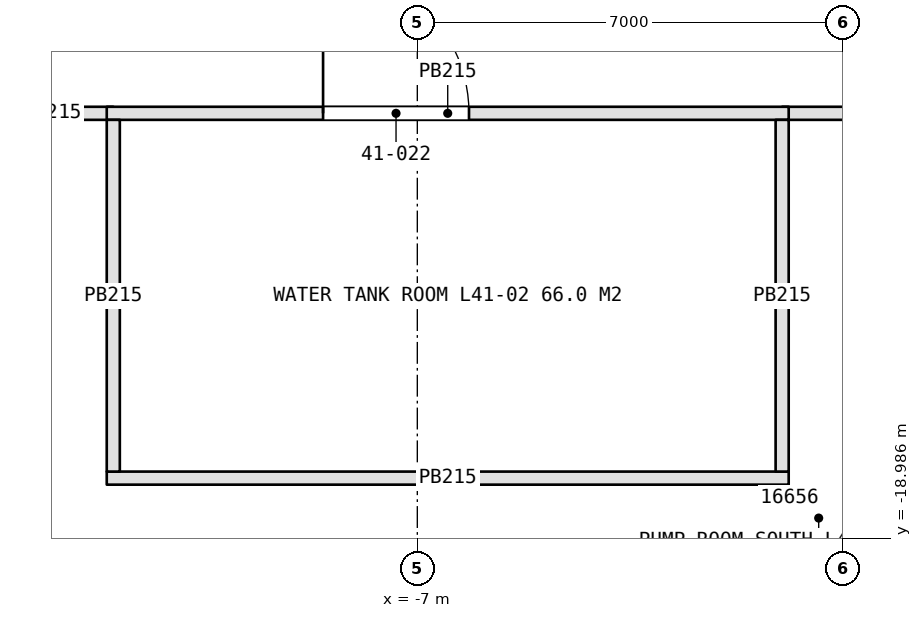
"""IFC4 building model, lengths in metres.
Left out: names, types, materials, properties, quantities, classifications, styles, units other than length and angle.
Written with IfcOpenShell. Run it as: python <this file> out.ifc"""

import sys

from ifc_helpers import new_model, si_unit, direction, frame, frame_2d, origin, origin_2d, place, context, subcontext, project, spatial, rectangle, hollow_rectangle, extrude, element, fill, save


model = new_model("IFC4")
c1 = context("Model", 3, precision=1e-05, world=origin(), true_north=direction((0.0, 1.0)))
c2 = subcontext(c1, "Body", "Model", "MODEL_VIEW")
j1 = project(units=[si_unit("LENGTHUNIT", "METRE"), si_unit("PLANEANGLEUNIT", "RADIAN")], contexts=[c1])
p1 = place(None, origin())
s1 = spatial("IfcSite", under=j1, at=p1, CompositionType="ELEMENT")
p2 = place(p1, origin())
s2 = spatial("IfcBuilding", under=s1, at=p2, CompositionType="ELEMENT")
p3 = place(p2, frame((0.0, 0.0, 189.8)))
s3 = spatial("IfcBuildingStorey", under=s2, at=p3, CompositionType="ELEMENT", Elevation=189.8)
p4 = place(p3, frame((-16.437, -21.164, 0.775), z_axis=(0.491993120685, 0.633450123943, 0.597230030788), x_axis=(-0.789769123982, 0.613404214857, 0.0)))
e1 = element("IfcColumn", 1, at=p4, inside=s3, PredefinedType="COLUMN", context=c2, shape_type="SweptSolid", body=[
    extrude(hollow_rectangle(XDim=1.3, YDim=1.3, WallThickness=0.15, at=origin_2d()), origin(), (0.0, 0.0, 1.0), 5.777),
])
p5 = place(p3, frame((-14.0, -12.0, 0.0), z_axis=(0.0, 0.0, 1.0), x_axis=(1.0, 0.0, 0.0)))
e2 = element("IfcWall", 2, at=p5, inside=s3, PredefinedType="PARTITIONING", context=c2, shape_type="SweptSolid", body=[
    extrude(rectangle(XDim=2.0, YDim=0.215, at=frame_2d((1.0, 0.0))), origin(), (0.0, 0.0, 1.0), 4.2),
])
p6 = place(p3, frame((-1.0, -12.0, 0.0), z_axis=(0.0, 0.0, 1.0), x_axis=(1.0, 0.0, 0.0)))
e3 = element("IfcWall", 3, at=p6, inside=s3, PredefinedType="PARTITIONING", context=c2, shape_type="SweptSolid", body=[
    extrude(rectangle(XDim=3.0, YDim=0.215, at=frame_2d((1.5, 0.0))), origin(), (0.0, 0.0, 1.0), 4.2),
])
p7 = place(p6, frame((1.7, 0.0, 0.0)))
e4 = element("IfcOpeningElement", 4, at=p7, cuts=e3, PredefinedType="OPENING", context=c2, shape_type="SweptSolid", body=[
    extrude(rectangle(XDim=1.0, YDim=2.2, at=frame_2d((0.5, 1.1))), frame((0.0, 0.118, 0.0), z_axis=(0.0, -1.0, 0.0), x_axis=(1.0, 0.0, 0.0)), (0.0, 0.0, 1.0), 0.235),
])
p8 = place(p3, frame((-12.107, -18.0, 0.0), z_axis=(0.0, 0.0, 1.0), x_axis=(1.0, 0.0, 0.0)))
e5 = element("IfcWall", 5, at=p8, inside=s3, PredefinedType="PARTITIONING", context=c2, shape_type="SweptSolid", body=[
    extrude(rectangle(XDim=11.215, YDim=0.215, at=frame_2d((5.607, 0.0))), origin(), (0.0, 0.0, 1.0), 4.2),
])
p9 = place(p3, frame((-12.107, -12.0, 0.0), z_axis=(0.0, 0.0, 1.0), x_axis=(1.0, 0.0, 0.0)))
e6 = element("IfcWall", 6, at=p9, inside=s3, PredefinedType="PARTITIONING", context=c2, shape_type="SweptSolid", body=[
    extrude(rectangle(XDim=11.215, YDim=0.215, at=frame_2d((5.607, 0.0))), origin(), (0.0, 0.0, 1.0), 4.2),
])
p10 = place(p9, frame((3.558, 0.0, 0.0)))
e7 = element("IfcOpeningElement", 7, at=p10, cuts=e6, PredefinedType="OPENING", context=c2, shape_type="SweptSolid", body=[
    extrude(rectangle(XDim=2.4, YDim=2.4, at=frame_2d((1.2, 1.2))), frame((0.0, 0.118, 0.0), z_axis=(0.0, -1.0, 0.0), x_axis=(1.0, 0.0, 0.0)), (0.0, 0.0, 1.0), 0.235),
])
for number, where, z_axis, x_axis in (
    (8, (-12.0, -17.893, 0.0), (0.0, 0.0, 1.0), (0.0, 1.0, 0.0)),
    (9, (-1.0, -17.893, 0.0), (0.0, 0.0, 1.0), (0.0, 1.0, 0.0)),
):
    element("IfcWall", number, at=place(p3, frame(where, z_axis=z_axis, x_axis=x_axis)), inside=s3, PredefinedType="PARTITIONING", context=c2, shape_type="SweptSolid", body=[
        extrude(rectangle(XDim=5.785, YDim=0.215, at=frame_2d((2.893, 0.0))), origin(), (0.0, 0.0, 1.0), 4.2),
    ])
p11 = place(p10, origin())
e10 = element("IfcDoor", 10, at=p11, inside=s3, OperationType="DOUBLE_DOOR_SINGLE_SWING", PredefinedType="DOOR", context=c2, shape_type="SweptSolid", body=[
    extrude(rectangle(XDim=2.4, YDim=2.4, at=frame_2d((1.2, 1.2))), frame((0.0, 0.025, 0.0), z_axis=(0.0, -1.0, 0.0), x_axis=(1.0, 0.0, 0.0)), (0.0, 0.0, 1.0), 0.05),
])
fill(e7, e10)
save(model, sys.argv[1])
